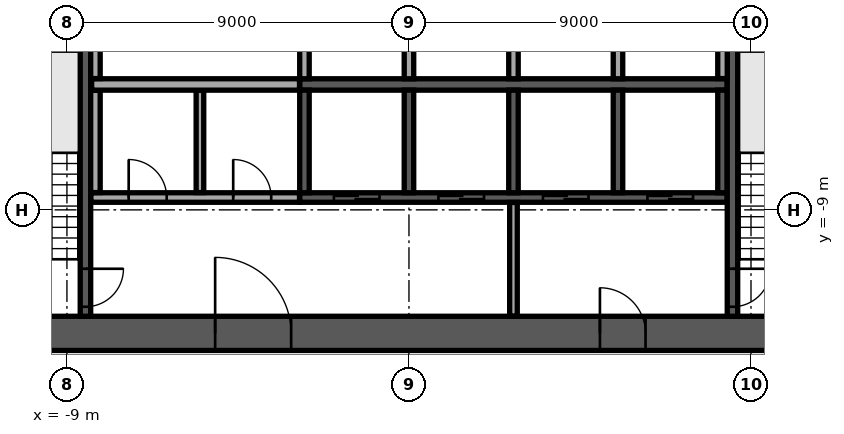
"""IFC4 building model, lengths in metres.
Left out: names, types, materials, properties, quantities, classifications, styles, units other than length and angle.
Written with IfcOpenShell. Run it as: python <this file> out.ifc"""

import sys

from ifc_helpers import new_model, si_unit, direction, frame, frame_2d, origin, place, context, subcontext, project, spatial, rectangle, extrude, element, fill, save


model = new_model("IFC4")
c1 = context("Model", 3, precision=1e-05, world=origin(), true_north=direction((0.0, 1.0)))
c2 = subcontext(c1, "Body", "Model", "MODEL_VIEW")
j1 = project(units=[si_unit("LENGTHUNIT", "METRE"), si_unit("PLANEANGLEUNIT", "RADIAN")], contexts=[c1])
p1 = place(None, origin())
s1 = spatial("IfcSite", under=j1, at=p1, CompositionType="ELEMENT")
p2 = place(p1, origin())
s2 = spatial("IfcBuilding", under=s1, at=p2, CompositionType="ELEMENT")
p3 = place(p2, frame((0.0, 0.0, 217.3)))
s3 = spatial("IfcBuildingStorey", under=s2, at=p3, CompositionType="ELEMENT", Elevation=217.3)
p4 = place(p3, frame((-12.7, -12.25, 0.0), z_axis=(0.0, 0.0, 1.0), x_axis=(1.0, 0.0, 0.0)))
e1 = element("IfcWall", 1, at=p4, inside=s3, PredefinedType="SHEAR", context=c2, shape_type="SweptSolid", body=[
    extrude(rectangle(XDim=25.4, YDim=0.9, at=frame_2d((12.7, 0.0))), origin(), (0.0, 0.0, 1.0), 3.62),
])
p5 = place(p4, frame((7.6, 0.0, 0.0)))
e2 = element("IfcOpeningElement", 2, at=p5, cuts=e1, PredefinedType="OPENING", context=c2, shape_type="SweptSolid", body=[
    extrude(rectangle(XDim=2.0, YDim=2.1, at=frame_2d((1.0, 1.05))), frame((0.0, 0.46, 0.0), z_axis=(0.0, -1.0, 0.0), x_axis=(1.0, 0.0, 0.0)), (0.0, 0.0, 1.0), 0.92),
])
p6 = place(p4, frame((17.725, 0.0, 0.0)))
e3 = element("IfcOpeningElement", 3, at=p6, cuts=e1, PredefinedType="OPENING", context=c2, shape_type="SweptSolid", body=[
    extrude(rectangle(XDim=1.2, YDim=2.1, at=frame_2d((0.6, 1.05))), frame((0.0, 0.46, 0.0), z_axis=(0.0, -1.0, 0.0), x_axis=(1.0, 0.0, 0.0)), (0.0, 0.0, 1.0), 0.92),
])
p7 = place(p4, frame((1.875, 0.0, 0.0)))
e4 = element("IfcOpeningElement", 4, at=p7, cuts=e1, PredefinedType="OPENING", context=c2, shape_type="SweptSolid", body=[
    extrude(rectangle(XDim=1.2, YDim=2.1, at=frame_2d((0.6, 1.05))), frame((0.0, 0.46, 0.0), z_axis=(0.0, -1.0, 0.0), x_axis=(1.0, 0.0, 0.0)), (0.0, 0.0, 1.0), 0.92),
])
p8 = place(p4, frame((22.325, 0.0, 0.0)))
e5 = element("IfcOpeningElement", 5, at=p8, cuts=e1, PredefinedType="OPENING", context=c2, shape_type="SweptSolid", body=[
    extrude(rectangle(XDim=1.2, YDim=2.1, at=frame_2d((0.6, 1.05))), frame((0.0, 0.46, 0.0), z_axis=(0.0, -1.0, 0.0), x_axis=(1.0, 0.0, 0.0)), (0.0, 0.0, 1.0), 0.92),
])
p9 = place(p3, frame((-2.875, -5.7, 0.0), z_axis=(0.0, 0.0, 1.0), x_axis=(1.0, 0.0, 0.0)))
e6 = element("IfcWall", 6, at=p9, inside=s3, PredefinedType="SOLIDWALL", context=c2, shape_type="SweptSolid", body=[
    extrude(rectangle(XDim=11.25, YDim=0.3, at=frame_2d((5.625, 0.0))), origin(), (0.0, 0.0, 1.0), 3.62),
])
for number, where, z_axis, x_axis in (
    (7, (-2.75, -5.55, 0.0), (0.0, 0.0, 1.0), (0.0, 1.0, 0.0)),
    (8, (0.0, -5.55, 0.0), (0.0, 0.0, 1.0), (0.0, 1.0, 0.0)),
    (9, (2.75, -5.55, 0.0), (0.0, 0.0, 1.0), (0.0, 1.0, 0.0)),
    (10, (5.5, -5.55, 0.0), (0.0, 0.0, 1.0), (0.0, 1.0, 0.0)),
):
    element("IfcWall", number, at=place(p3, frame(where, z_axis=z_axis, x_axis=x_axis)), inside=s3, PredefinedType="SOLIDWALL", context=c2, shape_type="SweptSolid", body=[
        extrude(rectangle(XDim=2.7, YDim=0.25, at=frame_2d((1.35, 0.0))), origin(), (0.0, 0.0, 1.0), 3.62),
    ])
p10 = place(p3, frame((-2.875, -8.675, 0.0), z_axis=(0.0, 0.0, 1.0), x_axis=(1.0, 0.0, 0.0)))
e11 = element("IfcWall", 11, at=p10, inside=s3, PredefinedType="SOLIDWALL", context=c2, shape_type="SweptSolid", body=[
    extrude(rectangle(XDim=11.25, YDim=0.25, at=frame_2d((5.625, 0.0))), origin(), (0.0, 0.0, 1.0), 3.62),
])
p11 = place(p10, frame((0.9, 0.0, 0.0)))
e12 = element("IfcOpeningElement", 12, at=p11, cuts=e11, PredefinedType="OPENING", context=c2, shape_type="SweptSolid", body=[
    extrude(rectangle(XDim=1.2, YDim=2.1, at=frame_2d((0.6, 1.05))), frame((0.0, 0.135, 0.0), z_axis=(0.0, -1.0, 0.0), x_axis=(1.0, 0.0, 0.0)), (0.0, 0.0, 1.0), 0.27),
])
p12 = place(p10, frame((3.65, 0.0, 0.0)))
e13 = element("IfcOpeningElement", 13, at=p12, cuts=e11, PredefinedType="OPENING", context=c2, shape_type="SweptSolid", body=[
    extrude(rectangle(XDim=1.2, YDim=2.1, at=frame_2d((0.6, 1.05))), frame((0.0, 0.135, 0.0), z_axis=(0.0, -1.0, 0.0), x_axis=(1.0, 0.0, 0.0)), (0.0, 0.0, 1.0), 0.27),
])
p13 = place(p10, frame((6.4, 0.0, 0.0)))
e14 = element("IfcOpeningElement", 14, at=p13, cuts=e11, PredefinedType="OPENING", context=c2, shape_type="SweptSolid", body=[
    extrude(rectangle(XDim=1.2, YDim=2.1, at=frame_2d((0.6, 1.05))), frame((0.0, 0.135, 0.0), z_axis=(0.0, -1.0, 0.0), x_axis=(1.0, 0.0, 0.0)), (0.0, 0.0, 1.0), 0.27),
])
p14 = place(p10, frame((9.15, 0.0, 0.0)))
e15 = element("IfcOpeningElement", 15, at=p14, cuts=e11, PredefinedType="OPENING", context=c2, shape_type="SweptSolid", body=[
    extrude(rectangle(XDim=1.2, YDim=2.1, at=frame_2d((0.6, 1.05))), frame((0.0, 0.135, 0.0), z_axis=(0.0, -1.0, 0.0), x_axis=(1.0, 0.0, 0.0)), (0.0, 0.0, 1.0), 0.27),
])
for number, where, z_axis, x_axis in (
    (16, (-2.75, -8.55, 0.0), (0.0, 0.0, 1.0), (0.0, 1.0, 0.0)),
    (17, (0.0, -8.55, 0.0), (0.0, 0.0, 1.0), (0.0, 1.0, 0.0)),
    (18, (2.75, -8.55, 0.0), (0.0, 0.0, 1.0), (0.0, 1.0, 0.0)),
    (19, (5.5, -8.55, 0.0), (0.0, 0.0, 1.0), (0.0, 1.0, 0.0)),
    (20, (8.25, -8.55, 0.0), (0.0, 0.0, 1.0), (0.0, 1.0, 0.0)),
):
    element("IfcWall", number, at=place(p3, frame(where, z_axis=z_axis, x_axis=x_axis)), inside=s3, PredefinedType="SOLIDWALL", context=c2, shape_type="SweptSolid", body=[
        extrude(rectangle(XDim=2.7, YDim=0.25, at=frame_2d((1.35, 0.0))), origin(), (0.0, 0.0, 1.0), 3.62),
    ])
p15 = place(p3, frame((-8.512, -4.55, 0.0), z_axis=(0.0, 0.0, 1.0), x_axis=(0.0, -1.0, 0.0)))
e21 = element("IfcWall", 21, at=p15, inside=s3, PredefinedType="SOLIDWALL", context=c2, shape_type="SweptSolid", body=[
    extrude(rectangle(XDim=7.25, YDim=0.275, at=frame_2d((3.625, 0.0))), origin(), (0.0, 0.0, 1.0), 3.62),
])
p16 = place(p15, frame((6.0, 0.0, 0.0)))
e22 = element("IfcOpeningElement", 22, at=p16, cuts=e21, PredefinedType="OPENING", context=c2, shape_type="SweptSolid", body=[
    extrude(rectangle(XDim=1.0, YDim=2.1, at=frame_2d((0.5, 1.05))), frame((0.0, 0.147, 0.0), z_axis=(0.0, -1.0, 0.0), x_axis=(1.0, 0.0, 0.0)), (0.0, 0.0, 1.0), 0.295),
])
p17 = place(p3, frame((8.512, -4.55, 0.0), z_axis=(0.0, 0.0, 1.0), x_axis=(0.0, -1.0, 0.0)))
e23 = element("IfcWall", 23, at=p17, inside=s3, PredefinedType="SOLIDWALL", context=c2, shape_type="SweptSolid", body=[
    extrude(rectangle(XDim=7.25, YDim=0.275, at=frame_2d((3.625, 0.0))), origin(), (0.0, 0.0, 1.0), 3.62),
])
p18 = place(p17, frame((6.0, 0.0, 0.0)))
e24 = element("IfcOpeningElement", 24, at=p18, cuts=e23, PredefinedType="OPENING", context=c2, shape_type="SweptSolid", body=[
    extrude(rectangle(XDim=1.0, YDim=2.1, at=frame_2d((0.5, 1.05))), frame((0.0, 0.147, 0.0), z_axis=(0.0, -1.0, 0.0), x_axis=(1.0, 0.0, 0.0)), (0.0, 0.0, 1.0), 0.295),
])
p19 = place(p3, frame((2.75, -11.795, 0.0), z_axis=(0.0, 0.0, 1.0), x_axis=(0.0, 1.0, 0.0)))
e25 = element("IfcWall", 25, at=p19, inside=s3, PredefinedType="PARTITIONING", context=c2, shape_type="SweptSolid", body=[
    extrude(rectangle(XDim=2.99, YDim=0.2, at=frame_2d((1.495, 0.0))), origin(), (0.0, 0.0, 1.0), 3.62),
])
p20 = place(p3, frame((-8.37, -8.675, 0.0), z_axis=(0.0, 0.0, 1.0), x_axis=(1.0, 0.0, 0.0)))
e26 = element("IfcWall", 26, at=p20, inside=s3, PredefinedType="PARTITIONING", context=c2, shape_type="SweptSolid", body=[
    extrude(rectangle(XDim=5.49, YDim=0.25, at=frame_2d((2.745, 0.0))), origin(), (0.0, 0.0, 1.0), 3.62),
])
p21 = place(p20, frame((0.995, 0.0, 0.0)))
e27 = element("IfcOpeningElement", 27, at=p21, cuts=e26, PredefinedType="OPENING", context=c2, shape_type="SweptSolid", body=[
    extrude(rectangle(XDim=1.0, YDim=2.1, at=frame_2d((0.5, 1.05))), frame((0.0, 0.135, 0.0), z_axis=(0.0, -1.0, 0.0), x_axis=(1.0, 0.0, 0.0)), (0.0, 0.0, 1.0), 0.27),
])
p22 = place(p20, frame((3.745, 0.0, 0.0)))
e28 = element("IfcOpeningElement", 28, at=p22, cuts=e26, PredefinedType="OPENING", context=c2, shape_type="SweptSolid", body=[
    extrude(rectangle(XDim=1.0, YDim=2.1, at=frame_2d((0.5, 1.05))), frame((0.0, 0.135, 0.0), z_axis=(0.0, -1.0, 0.0), x_axis=(1.0, 0.0, 0.0)), (0.0, 0.0, 1.0), 0.27),
])
p23 = place(p3, frame((-8.25, -8.545, 0.0), z_axis=(0.0, 0.0, 1.0), x_axis=(0.0, 1.0, 0.0)))
e29 = element("IfcWall", 29, at=p23, inside=s3, PredefinedType="PARTITIONING", context=c2, shape_type="SweptSolid", body=[
    extrude(rectangle(XDim=2.69, YDim=0.25, at=frame_2d((1.345, 0.0))), origin(), (0.0, 0.0, 1.0), 3.62),
])
p24 = place(p3, frame((-5.5, -8.545, 0.0), z_axis=(0.0, 0.0, 1.0), x_axis=(0.0, 1.0, 0.0)))
e30 = element("IfcWall", 30, at=p24, inside=s3, PredefinedType="PARTITIONING", context=c2, shape_type="SweptSolid", body=[
    extrude(rectangle(XDim=2.69, YDim=0.2, at=frame_2d((1.345, 0.0))), origin(), (0.0, 0.0, 1.0), 3.62),
])
p25 = place(p3, frame((-8.35, -5.7, 0.0), z_axis=(0.0, 0.0, 1.0), x_axis=(1.0, 0.0, 0.0)))
e31 = element("IfcWall", 31, at=p25, inside=s3, PredefinedType="PARTITIONING", context=c2, shape_type="SweptSolid", body=[
    extrude(rectangle(XDim=5.47, YDim=0.3, at=frame_2d((2.735, 0.0))), origin(), (0.0, 0.0, 1.0), 3.62),
])
for number, where, z_axis, x_axis in (
    (32, (-8.25, -5.545, 0.0), (0.0, 0.0, 1.0), (0.0, 1.0, 0.0)),
    (33, (8.25, -5.545, 0.0), (0.0, 0.0, 1.0), (0.0, 1.0, 0.0)),
):
    element("IfcWall", number, at=place(p3, frame(where, z_axis=z_axis, x_axis=x_axis)), inside=s3, PredefinedType="PARTITIONING", context=c2, shape_type="SweptSolid", body=[
        extrude(rectangle(XDim=2.69, YDim=0.25, at=frame_2d((1.345, 0.0))), origin(), (0.0, 0.0, 1.0), 3.62),
    ])
p26 = place(p3, frame((-34.365, -9.023, 0.0), z_axis=(0.0, 0.0, 1.0), x_axis=(0.743146896498, -0.66912830625, 0.0)))
e34 = element("IfcWall", 34, at=p26, inside=s3, PredefinedType="STANDARD", context=c2, shape_type="SweptSolid", body=[
    extrude(rectangle(XDim=39.0, YDim=0.6, at=frame_2d((19.5, 0.0))), origin(), (0.0, 0.0, 1.0), 3.62),
])
p27 = place(p26, frame((1.217, 0.0, 0.9)))
e35 = element("IfcOpeningElement", 35, at=p27, cuts=e34, PredefinedType="OPENING", context=c2, shape_type="SweptSolid", body=[
    extrude(rectangle(XDim=1.9, YDim=2.1, at=frame_2d((0.95, 1.05))), frame((0.0, 0.31, 0.0), z_axis=(0.0, -1.0, 0.0), x_axis=(1.0, 0.0, 0.0)), (0.0, 0.0, 1.0), 0.62),
])
p28 = place(p26, frame((5.55, 0.0, 0.9)))
e36 = element("IfcOpeningElement", 36, at=p28, cuts=e34, PredefinedType="OPENING", context=c2, shape_type="SweptSolid", body=[
    extrude(rectangle(XDim=1.9, YDim=2.1, at=frame_2d((0.95, 1.05))), frame((0.0, 0.31, 0.0), z_axis=(0.0, -1.0, 0.0), x_axis=(1.0, 0.0, 0.0)), (0.0, 0.0, 1.0), 0.62),
])
p29 = place(p26, frame((9.883, 0.0, 0.9)))
e37 = element("IfcOpeningElement", 37, at=p29, cuts=e34, PredefinedType="OPENING", context=c2, shape_type="SweptSolid", body=[
    extrude(rectangle(XDim=1.9, YDim=2.1, at=frame_2d((0.95, 1.05))), frame((0.0, 0.31, 0.0), z_axis=(0.0, -1.0, 0.0), x_axis=(1.0, 0.0, 0.0)), (0.0, 0.0, 1.0), 0.62),
])
p30 = place(p26, frame((14.217, 0.0, 0.9)))
e38 = element("IfcOpeningElement", 38, at=p30, cuts=e34, PredefinedType="OPENING", context=c2, shape_type="SweptSolid", body=[
    extrude(rectangle(XDim=1.9, YDim=2.1, at=frame_2d((0.95, 1.05))), frame((0.0, 0.31, 0.0), z_axis=(0.0, -1.0, 0.0), x_axis=(1.0, 0.0, 0.0)), (0.0, 0.0, 1.0), 0.62),
])
p31 = place(p26, frame((18.55, 0.0, 0.9)))
e39 = element("IfcOpeningElement", 39, at=p31, cuts=e34, PredefinedType="OPENING", context=c2, shape_type="SweptSolid", body=[
    extrude(rectangle(XDim=1.9, YDim=2.1, at=frame_2d((0.95, 1.05))), frame((0.0, 0.31, 0.0), z_axis=(0.0, -1.0, 0.0), x_axis=(1.0, 0.0, 0.0)), (0.0, 0.0, 1.0), 0.62),
])
p32 = place(p26, frame((22.883, 0.0, 0.9)))
e40 = element("IfcOpeningElement", 40, at=p32, cuts=e34, PredefinedType="OPENING", context=c2, shape_type="SweptSolid", body=[
    extrude(rectangle(XDim=1.9, YDim=2.1, at=frame_2d((0.95, 1.05))), frame((0.0, 0.31, 0.0), z_axis=(0.0, -1.0, 0.0), x_axis=(1.0, 0.0, 0.0)), (0.0, 0.0, 1.0), 0.62),
])
p33 = place(p26, frame((27.217, 0.0, 0.9)))
e41 = element("IfcOpeningElement", 41, at=p33, cuts=e34, PredefinedType="OPENING", context=c2, shape_type="SweptSolid", body=[
    extrude(rectangle(XDim=1.9, YDim=2.1, at=frame_2d((0.95, 1.05))), frame((0.0, 0.31, 0.0), z_axis=(0.0, -1.0, 0.0), x_axis=(1.0, 0.0, 0.0)), (0.0, 0.0, 1.0), 0.62),
])
p34 = place(p26, frame((31.55, 0.0, 0.9)))
e42 = element("IfcOpeningElement", 42, at=p34, cuts=e34, PredefinedType="OPENING", context=c2, shape_type="SweptSolid", body=[
    extrude(rectangle(XDim=1.9, YDim=2.1, at=frame_2d((0.95, 1.05))), frame((0.0, 0.31, 0.0), z_axis=(0.0, -1.0, 0.0), x_axis=(1.0, 0.0, 0.0)), (0.0, 0.0, 1.0), 0.62),
])
p35 = place(p26, frame((35.883, 0.0, 0.9)))
e43 = element("IfcOpeningElement", 43, at=p35, cuts=e34, PredefinedType="OPENING", context=c2, shape_type="SweptSolid", body=[
    extrude(rectangle(XDim=1.9, YDim=2.1, at=frame_2d((0.95, 1.05))), frame((0.0, 0.31, 0.0), z_axis=(0.0, -1.0, 0.0), x_axis=(1.0, 0.0, 0.0)), (0.0, 0.0, 1.0), 0.62),
])
p36 = place(p3, frame((1.962, -34.735, 0.0), z_axis=(0.0, 0.0, 1.0), x_axis=(0.669133181838, 0.743142506497, 0.0)))
e44 = element("IfcWall", 44, at=p36, inside=s3, PredefinedType="STANDARD", context=c2, shape_type="SweptSolid", body=[
    extrude(rectangle(XDim=49.0, YDim=0.6, at=frame_2d((24.5, 0.0))), origin(), (0.0, 0.0, 1.0), 3.62),
])
p37 = place(p36, frame((1.227, 0.0, 0.9)))
e45 = element("IfcOpeningElement", 45, at=p37, cuts=e44, PredefinedType="OPENING", context=c2, shape_type="SweptSolid", body=[
    extrude(rectangle(XDim=2.0, YDim=2.1, at=frame_2d((1.0, 1.05))), frame((0.0, 0.31, 0.0), z_axis=(0.0, -1.0, 0.0), x_axis=(1.0, 0.0, 0.0)), (0.0, 0.0, 1.0), 0.62),
])
p38 = place(p36, frame((5.682, 0.0, 0.9)))
e46 = element("IfcOpeningElement", 46, at=p38, cuts=e44, PredefinedType="OPENING", context=c2, shape_type="SweptSolid", body=[
    extrude(rectangle(XDim=2.0, YDim=2.1, at=frame_2d((1.0, 1.05))), frame((0.0, 0.31, 0.0), z_axis=(0.0, -1.0, 0.0), x_axis=(1.0, 0.0, 0.0)), (0.0, 0.0, 1.0), 0.62),
])
p39 = place(p36, frame((10.136, 0.0, 0.9)))
e47 = element("IfcOpeningElement", 47, at=p39, cuts=e44, PredefinedType="OPENING", context=c2, shape_type="SweptSolid", body=[
    extrude(rectangle(XDim=2.0, YDim=2.1, at=frame_2d((1.0, 1.05))), frame((0.0, 0.31, 0.0), z_axis=(0.0, -1.0, 0.0), x_axis=(1.0, 0.0, 0.0)), (0.0, 0.0, 1.0), 0.62),
])
p40 = place(p36, frame((14.591, 0.0, 0.9)))
e48 = element("IfcOpeningElement", 48, at=p40, cuts=e44, PredefinedType="OPENING", context=c2, shape_type="SweptSolid", body=[
    extrude(rectangle(XDim=2.0, YDim=2.1, at=frame_2d((1.0, 1.05))), frame((0.0, 0.31, 0.0), z_axis=(0.0, -1.0, 0.0), x_axis=(1.0, 0.0, 0.0)), (0.0, 0.0, 1.0), 0.62),
])
p41 = place(p36, frame((19.045, 0.0, 0.9)))
e49 = element("IfcOpeningElement", 49, at=p41, cuts=e44, PredefinedType="OPENING", context=c2, shape_type="SweptSolid", body=[
    extrude(rectangle(XDim=2.0, YDim=2.1, at=frame_2d((1.0, 1.05))), frame((0.0, 0.31, 0.0), z_axis=(0.0, -1.0, 0.0), x_axis=(1.0, 0.0, 0.0)), (0.0, 0.0, 1.0), 0.62),
])
p42 = place(p36, frame((23.5, 0.0, 0.9)))
e50 = element("IfcOpeningElement", 50, at=p42, cuts=e44, PredefinedType="OPENING", context=c2, shape_type="SweptSolid", body=[
    extrude(rectangle(XDim=2.0, YDim=2.1, at=frame_2d((1.0, 1.05))), frame((0.0, 0.31, 0.0), z_axis=(0.0, -1.0, 0.0), x_axis=(1.0, 0.0, 0.0)), (0.0, 0.0, 1.0), 0.62),
])
p43 = place(p36, frame((27.955, 0.0, 0.9)))
e51 = element("IfcOpeningElement", 51, at=p43, cuts=e44, PredefinedType="OPENING", context=c2, shape_type="SweptSolid", body=[
    extrude(rectangle(XDim=2.0, YDim=2.1, at=frame_2d((1.0, 1.05))), frame((0.0, 0.31, 0.0), z_axis=(0.0, -1.0, 0.0), x_axis=(1.0, 0.0, 0.0)), (0.0, 0.0, 1.0), 0.62),
])
p44 = place(p36, frame((32.409, 0.0, 0.9)))
e52 = element("IfcOpeningElement", 52, at=p44, cuts=e44, PredefinedType="OPENING", context=c2, shape_type="SweptSolid", body=[
    extrude(rectangle(XDim=2.0, YDim=2.1, at=frame_2d((1.0, 1.05))), frame((0.0, 0.31, 0.0), z_axis=(0.0, -1.0, 0.0), x_axis=(1.0, 0.0, 0.0)), (0.0, 0.0, 1.0), 0.62),
])
p45 = place(p36, frame((36.864, 0.0, 0.9)))
e53 = element("IfcOpeningElement", 53, at=p45, cuts=e44, PredefinedType="OPENING", context=c2, shape_type="SweptSolid", body=[
    extrude(rectangle(XDim=2.0, YDim=2.1, at=frame_2d((1.0, 1.05))), frame((0.0, 0.31, 0.0), z_axis=(0.0, -1.0, 0.0), x_axis=(1.0, 0.0, 0.0)), (0.0, 0.0, 1.0), 0.62),
])
p46 = place(p36, frame((41.318, 0.0, 0.9)))
e54 = element("IfcOpeningElement", 54, at=p46, cuts=e44, PredefinedType="OPENING", context=c2, shape_type="SweptSolid", body=[
    extrude(rectangle(XDim=2.0, YDim=2.1, at=frame_2d((1.0, 1.05))), frame((0.0, 0.31, 0.0), z_axis=(0.0, -1.0, 0.0), x_axis=(1.0, 0.0, 0.0)), (0.0, 0.0, 1.0), 0.62),
])
p47 = place(p36, frame((45.773, 0.0, 0.9)))
e55 = element("IfcOpeningElement", 55, at=p47, cuts=e44, PredefinedType="OPENING", context=c2, shape_type="SweptSolid", body=[
    extrude(rectangle(XDim=2.0, YDim=2.1, at=frame_2d((1.0, 1.05))), frame((0.0, 0.31, 0.0), z_axis=(0.0, -1.0, 0.0), x_axis=(1.0, 0.0, 0.0)), (0.0, 0.0, 1.0), 0.62),
])
p48 = place(p3, frame((-24.285, -7.708, 0.0), z_axis=(0.0, 0.0, 1.0), x_axis=(0.743144813636, -0.66913061951, 0.0)))
e56 = element("IfcWall", 56, at=p48, inside=s3, PredefinedType="PARTITIONING", context=c2, shape_type="SweptSolid", body=[
    extrude(rectangle(XDim=25.854, YDim=0.15, at=frame_2d((12.927, 0.0))), origin(), (0.0, 0.0, 1.0), 3.17),
])
p49 = place(p48, frame((9.29, 0.0, 0.0)))
e57 = element("IfcOpeningElement", 57, at=p49, cuts=e56, PredefinedType="OPENING", context=c2, shape_type="SweptSolid", body=[
    extrude(rectangle(XDim=1.0, YDim=2.1, at=frame_2d((0.5, 1.05))), frame((0.0, 0.085, 0.0), z_axis=(0.0, -1.0, 0.0), x_axis=(1.0, 0.0, 0.0)), (0.0, 0.0, 1.0), 0.17),
])
p50 = place(p3, frame((3.676, -24.653, 0.0), z_axis=(0.0, 0.0, 1.0), x_axis=(0.669124220942, 0.743150574882, 0.0)))
e58 = element("IfcWall", 58, at=p50, inside=s3, PredefinedType="PARTITIONING", context=c2, shape_type="SweptSolid", body=[
    extrude(rectangle(XDim=31.796, YDim=0.15, at=frame_2d((15.898, 0.0))), origin(), (0.0, 0.0, 1.0), 3.17),
])
p51 = place(p50, frame((9.41, 0.0, 0.0)))
e59 = element("IfcOpeningElement", 59, at=p51, cuts=e58, PredefinedType="OPENING", context=c2, shape_type="SweptSolid", body=[
    extrude(rectangle(XDim=1.0, YDim=2.1, at=frame_2d((0.5, 1.05))), frame((0.0, 0.085, 0.0), z_axis=(0.0, -1.0, 0.0), x_axis=(1.0, 0.0, 0.0)), (0.0, 0.0, 1.0), 0.17),
])
p52 = place(p50, frame((23.981, 0.0, 0.0)))
e60 = element("IfcOpeningElement", 60, at=p52, cuts=e58, PredefinedType="OPENING", context=c2, shape_type="SweptSolid", body=[
    extrude(rectangle(XDim=1.0, YDim=2.1, at=frame_2d((0.5, 1.05))), frame((0.0, 0.085, 0.0), z_axis=(0.0, -1.0, 0.0), x_axis=(1.0, 0.0, 0.0)), (0.0, 0.0, 1.0), 0.17),
])
p53 = place(p5, origin())
e61 = element("IfcDoor", 61, at=p53, inside=s3, OperationType="SINGLE_SWING_LEFT", PredefinedType="DOOR", context=c2, shape_type="SweptSolid", body=[
    extrude(rectangle(XDim=2.0, YDim=2.1, at=frame_2d((1.0, 1.05))), frame((0.0, 0.025, 0.0), z_axis=(0.0, -1.0, 0.0), x_axis=(1.0, 0.0, 0.0)), (0.0, 0.0, 1.0), 0.05),
])
fill(e2, e61)
p54 = place(p6, origin())
e62 = element("IfcDoor", 62, at=p54, inside=s3, OperationType="SINGLE_SWING_LEFT", PredefinedType="DOOR", context=c2, shape_type="SweptSolid", body=[
    extrude(rectangle(XDim=1.2, YDim=2.1, at=frame_2d((0.6, 1.05))), frame((0.0, 0.025, 0.0), z_axis=(0.0, -1.0, 0.0), x_axis=(1.0, 0.0, 0.0)), (0.0, 0.0, 1.0), 0.05),
])
fill(e3, e62)
p55 = place(p11, origin())
e63 = element("IfcDoor", 63, at=p55, inside=s3, OperationType="DOUBLE_DOOR_SLIDING", PredefinedType="DOOR", context=c2, shape_type="SweptSolid", body=[
    extrude(rectangle(XDim=1.2, YDim=2.1, at=frame_2d((0.6, 1.05))), frame((0.0, 0.025, 0.0), z_axis=(0.0, -1.0, 0.0), x_axis=(1.0, 0.0, 0.0)), (0.0, 0.0, 1.0), 0.05),
])
fill(e12, e63)
p56 = place(p12, origin())
e64 = element("IfcDoor", 64, at=p56, inside=s3, OperationType="DOUBLE_DOOR_SLIDING", PredefinedType="DOOR", context=c2, shape_type="SweptSolid", body=[
    extrude(rectangle(XDim=1.2, YDim=2.1, at=frame_2d((0.6, 1.05))), frame((0.0, 0.025, 0.0), z_axis=(0.0, -1.0, 0.0), x_axis=(1.0, 0.0, 0.0)), (0.0, 0.0, 1.0), 0.05),
])
fill(e13, e64)
p57 = place(p13, origin())
e65 = element("IfcDoor", 65, at=p57, inside=s3, OperationType="DOUBLE_DOOR_SLIDING", PredefinedType="DOOR", context=c2, shape_type="SweptSolid", body=[
    extrude(rectangle(XDim=1.2, YDim=2.1, at=frame_2d((0.6, 1.05))), frame((0.0, 0.025, 0.0), z_axis=(0.0, -1.0, 0.0), x_axis=(1.0, 0.0, 0.0)), (0.0, 0.0, 1.0), 0.05),
])
fill(e14, e65)
p58 = place(p14, origin())
e66 = element("IfcDoor", 66, at=p58, inside=s3, OperationType="DOUBLE_DOOR_SLIDING", PredefinedType="DOOR", context=c2, shape_type="SweptSolid", body=[
    extrude(rectangle(XDim=1.2, YDim=2.1, at=frame_2d((0.6, 1.05))), frame((0.0, 0.025, 0.0), z_axis=(0.0, -1.0, 0.0), x_axis=(1.0, 0.0, 0.0)), (0.0, 0.0, 1.0), 0.05),
])
fill(e15, e66)
p59 = place(p16, origin())
e67 = element("IfcDoor", 67, at=p59, inside=s3, OperationType="SINGLE_SWING_LEFT", PredefinedType="DOOR", context=c2, shape_type="SweptSolid", body=[
    extrude(rectangle(XDim=1.0, YDim=2.1, at=frame_2d((0.5, 1.05))), frame((0.0, 0.025, 0.0), z_axis=(0.0, -1.0, 0.0), x_axis=(1.0, 0.0, 0.0)), (0.0, 0.0, 1.0), 0.05),
])
fill(e22, e67)
p60 = place(p18, origin())
e68 = element("IfcDoor", 68, at=p60, inside=s3, OperationType="SINGLE_SWING_LEFT", PredefinedType="DOOR", context=c2, shape_type="SweptSolid", body=[
    extrude(rectangle(XDim=1.0, YDim=2.1, at=frame_2d((0.5, 1.05))), frame((0.0, 0.025, 0.0), z_axis=(0.0, -1.0, 0.0), x_axis=(1.0, 0.0, 0.0)), (0.0, 0.0, 1.0), 0.05),
])
fill(e24, e68)
p61 = place(p21, origin())
e69 = element("IfcDoor", 69, at=p61, inside=s3, OperationType="SINGLE_SWING_RIGHT", PredefinedType="DOOR", context=c2, shape_type="SweptSolid", body=[
    extrude(rectangle(XDim=1.0, YDim=2.1, at=frame_2d((0.5, 1.05))), frame((0.0, 0.025, 0.0), z_axis=(0.0, -1.0, 0.0), x_axis=(1.0, 0.0, 0.0)), (0.0, 0.0, 1.0), 0.05),
])
fill(e27, e69)
p62 = place(p22, origin())
e70 = element("IfcDoor", 70, at=p62, inside=s3, OperationType="SINGLE_SWING_RIGHT", PredefinedType="DOOR", context=c2, shape_type="SweptSolid", body=[
    extrude(rectangle(XDim=1.0, YDim=2.1, at=frame_2d((0.5, 1.05))), frame((0.0, 0.025, 0.0), z_axis=(0.0, -1.0, 0.0), x_axis=(1.0, 0.0, 0.0)), (0.0, 0.0, 1.0), 0.05),
])
fill(e28, e70)
save(model, sys.argv[1])
